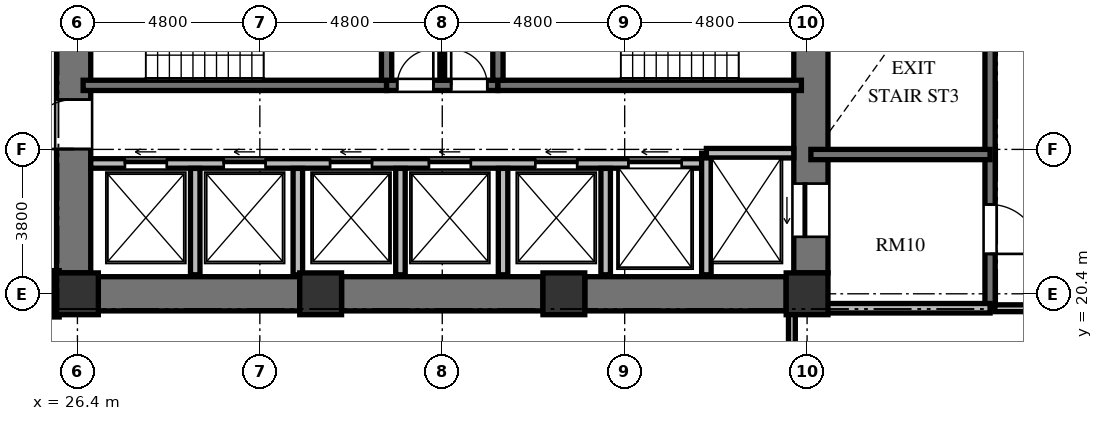
"""IFC4 building model, lengths in metres.
Left out: names, types, materials, properties, quantities, classifications, styles, units other than length and angle.
Written with IfcOpenShell. Run it as: python <this file> out.ifc"""

import sys

from ifc_helpers import new_model, si_unit, direction, frame, frame_2d, origin, origin_2d, place, context, subcontext, project, spatial, rectangle, extrude, element, fill, save


model = new_model("IFC4")
c1 = context("Model", 3, precision=1e-05, world=origin(), true_north=direction((0.0, 1.0)))
c2 = subcontext(c1, "Body", "Model", "MODEL_VIEW")
j1 = project(units=[si_unit("LENGTHUNIT", "METRE"), si_unit("PLANEANGLEUNIT", "RADIAN")], contexts=[c1])
p1 = place(None, origin())
s1 = spatial("IfcSite", under=j1, at=p1, CompositionType="ELEMENT")
p2 = place(p1, origin())
s2 = spatial("IfcBuilding", under=s1, at=p2, CompositionType="ELEMENT")
p3 = place(p2, frame((0.0, 0.0, 43.44)))
s3 = spatial("IfcBuildingStorey", under=s2, at=p3, CompositionType="ELEMENT", Elevation=43.44)
for number, where, z_axis, x_axis in (
    (1, (26.4, 20.4, 0.0), (0.0, 0.0, 1.0), (1.0, 0.0, 0.0)),
    (2, (32.8, 20.4, 0.0), (0.0, 0.0, 1.0), (1.0, 0.0, 0.0)),
    (3, (39.2, 20.4, 0.0), (0.0, 0.0, 1.0), (1.0, 0.0, 0.0)),
    (4, (45.6, 20.4, 0.0), (0.0, 0.0, 1.0), (1.0, 0.0, 0.0)),
):
    element("IfcColumn", number, at=place(p3, frame(where, z_axis=z_axis, x_axis=x_axis)), inside=s3, PredefinedType="COLUMN", context=c2, shape_type="SweptSolid", body=[
        extrude(rectangle(XDim=1.1, YDim=1.1, at=origin_2d()), origin(), (0.0, 0.0, 1.0), 3.648),
    ])
p4 = place(p3, frame((26.3, 20.95, 0.0), z_axis=(0.0, 0.0, 1.0), x_axis=(0.0, 1.0, 0.0)))
e5 = element("IfcWall", 5, at=p4, inside=s3, PredefinedType="SHEAR", context=c2, shape_type="SweptSolid", body=[
    extrude(rectangle(XDim=14.1, YDim=0.9, at=frame_2d((7.05, 0.0))), origin(), (0.0, 0.0, 1.0), 3.648),
])
p5 = place(p4, frame((6.5, 0.0, 0.0)))
e6 = element("IfcOpeningElement", 6, at=p5, cuts=e5, PredefinedType="OPENING", context=c2, shape_type="SweptSolid", body=[
    extrude(rectangle(XDim=1.2, YDim=2.15, at=frame_2d((0.6, 1.075))), frame((0.0, 0.46, 0.0), z_axis=(0.0, -1.0, 0.0), x_axis=(1.0, 0.0, 0.0)), (0.0, 0.0, 1.0), 0.92),
])
p6 = place(p4, frame((9.6, 0.0, 0.0)))
e7 = element("IfcOpeningElement", 7, at=p6, cuts=e5, PredefinedType="OPENING", context=c2, shape_type="SweptSolid", body=[
    extrude(rectangle(XDim=1.3, YDim=2.2, at=frame_2d((0.65, 1.1))), frame((0.0, 0.46, 0.0), z_axis=(0.0, -1.0, 0.0), x_axis=(1.0, 0.0, 0.0)), (0.0, 0.0, 1.0), 0.92),
])
p7 = place(p4, frame((3.26, 0.0, 0.0)))
e8 = element("IfcOpeningElement", 8, at=p7, cuts=e5, PredefinedType="OPENING", context=c2, shape_type="SweptSolid", body=[
    extrude(rectangle(XDim=1.3, YDim=2.2, at=frame_2d((0.65, 1.1))), frame((0.0, 0.46, 0.0), z_axis=(0.0, -1.0, 0.0), x_axis=(1.0, 0.0, 0.0)), (0.0, 0.0, 1.0), 0.92),
])
p8 = place(p3, frame((45.7, 20.95, 0.0), z_axis=(0.0, 0.0, 1.0), x_axis=(0.0, 1.0, 0.0)))
e9 = element("IfcWall", 9, at=p8, inside=s3, PredefinedType="SHEAR", context=c2, shape_type="SweptSolid", body=[
    extrude(rectangle(XDim=14.1, YDim=0.9, at=frame_2d((7.05, 0.0))), origin(), (0.0, 0.0, 1.0), 3.648),
])
p9 = place(p8, frame((11.75, 0.0, 0.0)))
e10 = element("IfcOpeningElement", 10, at=p9, cuts=e9, PredefinedType="OPENING", context=c2, shape_type="SweptSolid", body=[
    extrude(rectangle(XDim=1.4, YDim=2.3, at=frame_2d((0.7, 1.15))), frame((0.0, 0.46, 0.0), z_axis=(0.0, -1.0, 0.0), x_axis=(1.0, 0.0, 0.0)), (0.0, 0.0, 1.0), 0.92),
])
p10 = place(p8, frame((0.95, 0.0, 0.0)))
e11 = element("IfcOpeningElement", 11, at=p10, cuts=e9, PredefinedType="OPENING", context=c2, shape_type="SweptSolid", body=[
    extrude(rectangle(XDim=1.4, YDim=2.3, at=frame_2d((0.7, 1.15))), frame((0.0, 0.46, 0.0), z_axis=(0.0, -1.0, 0.0), x_axis=(1.0, 0.0, 0.0)), (0.0, 0.0, 1.0), 0.92),
])
p11 = place(p3, frame((26.95, 20.4, 0.0), z_axis=(0.0, 0.0, 1.0), x_axis=(1.0, 0.0, 0.0)))
e12 = element("IfcWall", 12, at=p11, inside=s3, PredefinedType="SHEAR", context=c2, shape_type="SweptSolid", body=[
    extrude(rectangle(XDim=5.3, YDim=0.9, at=frame_2d((2.65, 0.0))), origin(), (0.0, 0.0, 1.0), 3.648),
])
p12 = place(p3, frame((33.35, 20.4, 0.0), z_axis=(0.0, 0.0, 1.0), x_axis=(1.0, 0.0, 0.0)))
e13 = element("IfcWall", 13, at=p12, inside=s3, PredefinedType="SHEAR", context=c2, shape_type="SweptSolid", body=[
    extrude(rectangle(XDim=5.3, YDim=0.9, at=frame_2d((2.65, 0.0))), origin(), (0.0, 0.0, 1.0), 3.648),
])
p13 = place(p3, frame((39.75, 20.4, 0.0), z_axis=(0.0, 0.0, 1.0), x_axis=(1.0, 0.0, 0.0)))
e14 = element("IfcWall", 14, at=p13, inside=s3, PredefinedType="SHEAR", context=c2, shape_type="SweptSolid", body=[
    extrude(rectangle(XDim=5.3, YDim=0.9, at=frame_2d((2.65, 0.0))), origin(), (0.0, 0.0, 1.0), 3.648),
])
p14 = place(p3, frame((26.55, 25.885, 0.0), z_axis=(0.0, 0.0, 1.0), x_axis=(1.0, 0.0, 0.0)))
e15 = element("IfcWall", 15, at=p14, inside=s3, PredefinedType="SHEAR", context=c2, shape_type="SweptSolid", body=[
    extrude(rectangle(XDim=7.985, YDim=0.27, at=frame_2d((3.992, 0.0))), origin(), (0.0, 0.0, 1.0), 3.648),
])
p15 = place(p3, frame((34.535, 25.885, 0.0), z_axis=(0.0, 0.0, 1.0), x_axis=(1.0, 0.0, 0.0)))
e16 = element("IfcWall", 16, at=p15, inside=s3, PredefinedType="SHEAR", context=c2, shape_type="SweptSolid", body=[
    extrude(rectangle(XDim=2.93, YDim=0.27, at=frame_2d((1.465, 0.0))), origin(), (0.0, 0.0, 1.0), 3.648),
])
p16 = place(p15, frame((0.28, 0.0, 0.0)))
e17 = element("IfcOpeningElement", 17, at=p16, cuts=e16, PredefinedType="OPENING", context=c2, shape_type="SweptSolid", body=[
    extrude(rectangle(XDim=0.95, YDim=2.1, at=frame_2d((0.475, 1.05))), frame((0.0, 0.145, 0.0), z_axis=(0.0, -1.0, 0.0), x_axis=(1.0, 0.0, 0.0)), (0.0, 0.0, 1.0), 0.29),
])
p17 = place(p15, frame((1.7, 0.0, 0.0)))
e18 = element("IfcOpeningElement", 18, at=p17, cuts=e16, PredefinedType="OPENING", context=c2, shape_type="SweptSolid", body=[
    extrude(rectangle(XDim=0.95, YDim=2.1, at=frame_2d((0.475, 1.05))), frame((0.0, 0.145, 0.0), z_axis=(0.0, -1.0, 0.0), x_axis=(1.0, 0.0, 0.0)), (0.0, 0.0, 1.0), 0.29),
])
p18 = place(p3, frame((37.465, 25.885, 0.0), z_axis=(0.0, 0.0, 1.0), x_axis=(1.0, 0.0, 0.0)))
e19 = element("IfcWall", 19, at=p18, inside=s3, PredefinedType="SHEAR", context=c2, shape_type="SweptSolid", body=[
    extrude(rectangle(XDim=7.985, YDim=0.27, at=frame_2d((3.992, 0.0))), origin(), (0.0, 0.0, 1.0), 3.648),
])
for number, where, z_axis, x_axis in (
    (20, (34.535, 26.02, 0.0), (0.0, 0.0, 1.0), (0.0, 1.0, 0.0)),
    (21, (37.465, 26.02, 0.0), (0.0, 0.0, 1.0), (0.0, 1.0, 0.0)),
):
    element("IfcWall", number, at=place(p3, frame(where, z_axis=z_axis, x_axis=x_axis)), inside=s3, PredefinedType="SHEAR", context=c2, shape_type="SweptSolid", body=[
        extrude(rectangle(XDim=4.08, YDim=0.27, at=frame_2d((2.04, 0.0))), origin(), (0.0, 0.0, 1.0), 3.648),
    ])
p19 = place(p3, frame((36.0, 26.02, 0.0), z_axis=(0.0, 0.0, 1.0), x_axis=(0.0, 1.0, 0.0)))
e22 = element("IfcWall", 22, at=p19, inside=s3, PredefinedType="PARTITIONING", context=c2, shape_type="SweptSolid", body=[
    extrude(rectangle(XDim=4.08, YDim=0.125, at=frame_2d((2.04, 0.0))), origin(), (0.0, 0.0, 1.0), 3.428),
])
p20 = place(p3, frame((26.75, 23.83, 0.0), z_axis=(0.0, 0.0, 1.0), x_axis=(1.0, 0.0, 0.0)))
e23 = element("IfcWall", 23, at=p20, inside=s3, PredefinedType="SOLIDWALL", context=c2, shape_type="SweptSolid", body=[
    extrude(rectangle(XDim=16.2, YDim=0.25, at=frame_2d((8.1, 0.0))), origin(), (0.0, 0.0, 1.0), 3.428),
])
p21 = place(p20, frame((0.9, 0.0, 0.0)))
e24 = element("IfcOpeningElement", 24, at=p21, cuts=e23, PredefinedType="OPENING", context=c2, shape_type="SweptSolid", body=[
    extrude(rectangle(XDim=1.1, YDim=2.2, at=frame_2d((0.55, 1.1))), frame((0.0, 0.135, 0.0), z_axis=(0.0, -1.0, 0.0), x_axis=(1.0, 0.0, 0.0)), (0.0, 0.0, 1.0), 0.27),
])
p22 = place(p20, frame((3.5, 0.0, 0.0)))
e25 = element("IfcOpeningElement", 25, at=p22, cuts=e23, PredefinedType="OPENING", context=c2, shape_type="SweptSolid", body=[
    extrude(rectangle(XDim=1.1, YDim=2.2, at=frame_2d((0.55, 1.1))), frame((0.0, 0.135, 0.0), z_axis=(0.0, -1.0, 0.0), x_axis=(1.0, 0.0, 0.0)), (0.0, 0.0, 1.0), 0.27),
])
p23 = place(p20, frame((6.3, 0.0, 0.0)))
e26 = element("IfcOpeningElement", 26, at=p23, cuts=e23, PredefinedType="OPENING", context=c2, shape_type="SweptSolid", body=[
    extrude(rectangle(XDim=1.1, YDim=2.2, at=frame_2d((0.55, 1.1))), frame((0.0, 0.135, 0.0), z_axis=(0.0, -1.0, 0.0), x_axis=(1.0, 0.0, 0.0)), (0.0, 0.0, 1.0), 0.27),
])
p24 = place(p20, frame((8.9, 0.0, 0.0)))
e27 = element("IfcOpeningElement", 27, at=p24, cuts=e23, PredefinedType="OPENING", context=c2, shape_type="SweptSolid", body=[
    extrude(rectangle(XDim=1.1, YDim=2.2, at=frame_2d((0.55, 1.1))), frame((0.0, 0.135, 0.0), z_axis=(0.0, -1.0, 0.0), x_axis=(1.0, 0.0, 0.0)), (0.0, 0.0, 1.0), 0.27),
])
p25 = place(p20, frame((11.7, 0.0, 0.0)))
e28 = element("IfcOpeningElement", 28, at=p25, cuts=e23, PredefinedType="OPENING", context=c2, shape_type="SweptSolid", body=[
    extrude(rectangle(XDim=1.1, YDim=2.2, at=frame_2d((0.55, 1.1))), frame((0.0, 0.135, 0.0), z_axis=(0.0, -1.0, 0.0), x_axis=(1.0, 0.0, 0.0)), (0.0, 0.0, 1.0), 0.27),
])
p26 = place(p20, frame((14.15, 0.0, 0.0)))
e29 = element("IfcOpeningElement", 29, at=p26, cuts=e23, PredefinedType="OPENING", context=c2, shape_type="SweptSolid", body=[
    extrude(rectangle(XDim=1.4, YDim=2.3, at=frame_2d((0.7, 1.15))), frame((0.0, 0.135, 0.0), z_axis=(0.0, -1.0, 0.0), x_axis=(1.0, 0.0, 0.0)), (0.0, 0.0, 1.0), 0.27),
])
p27 = place(p3, frame((42.95, 20.9, 0.0), z_axis=(0.0, 0.0, 1.0), x_axis=(0.0, 1.0, 0.0)))
e30 = element("IfcWall", 30, at=p27, inside=s3, PredefinedType="SOLIDWALL", context=c2, shape_type="SweptSolid", body=[
    extrude(rectangle(XDim=3.2, YDim=0.25, at=frame_2d((1.6, 0.0))), origin(), (0.0, 0.0, 1.0), 3.428),
])
p28 = place(p3, frame((42.95, 24.1, 0.0), z_axis=(0.0, 0.0, 1.0), x_axis=(1.0, 0.0, 0.0)))
e31 = element("IfcWall", 31, at=p28, inside=s3, PredefinedType="SOLIDWALL", context=c2, shape_type="SweptSolid", body=[
    extrude(rectangle(XDim=2.3, YDim=0.25, at=frame_2d((1.15, 0.0))), origin(), (0.0, 0.0, 1.0), 3.428),
])
for number, where, z_axis, x_axis in (
    (32, (29.5, 20.9, 0.0), (0.0, 0.0, 1.0), (0.0, 1.0, 0.0)),
    (33, (32.2, 20.9, 0.0), (0.0, 0.0, 1.0), (0.0, 1.0, 0.0)),
    (34, (34.9, 20.9, 0.0), (0.0, 0.0, 1.0), (0.0, 1.0, 0.0)),
    (35, (37.6, 20.9, 0.0), (0.0, 0.0, 1.0), (0.0, 1.0, 0.0)),
    (36, (40.3, 20.9, 0.0), (0.0, 0.0, 1.0), (0.0, 1.0, 0.0)),
):
    element("IfcWall", number, at=place(p3, frame(where, z_axis=z_axis, x_axis=x_axis)), inside=s3, PredefinedType="SOLIDWALL", context=c2, shape_type="SweptSolid", body=[
        extrude(rectangle(XDim=2.8, YDim=0.25, at=frame_2d((1.4, 0.0))), origin(), (0.0, 0.0, 1.0), 3.428),
    ])
p29 = place(p3, frame((50.415, 35.845, 0.0), z_axis=(0.0, 0.0, 1.0), x_axis=(0.0, -1.0, 0.0)))
e37 = element("IfcWall", 37, at=p29, inside=s3, PredefinedType="SHEAR", context=c2, shape_type="SweptSolid", body=[
    extrude(rectangle(XDim=15.825, YDim=0.27, at=frame_2d((7.913, 0.0))), origin(), (0.0, 0.0, 1.0), 3.648),
])
p30 = place(p29, frame((4.445, 0.0, 0.0)))
e38 = element("IfcOpeningElement", 38, at=p30, cuts=e37, PredefinedType="OPENING", context=c2, shape_type="SweptSolid", body=[
    extrude(rectangle(XDim=1.2, YDim=2.15, at=frame_2d((0.6, 1.075))), frame((0.0, 0.145, 0.0), z_axis=(0.0, -1.0, 0.0), x_axis=(1.0, 0.0, 0.0)), (0.0, 0.0, 1.0), 0.29),
])
p31 = place(p29, frame((1.295, 0.0, 0.0)))
e39 = element("IfcOpeningElement", 39, at=p31, cuts=e37, PredefinedType="OPENING", context=c2, shape_type="SweptSolid", body=[
    extrude(rectangle(XDim=1.3, YDim=2.2, at=frame_2d((0.65, 1.1))), frame((0.0, 0.145, 0.0), z_axis=(0.0, -1.0, 0.0), x_axis=(1.0, 0.0, 0.0)), (0.0, 0.0, 1.0), 0.29),
])
p32 = place(p29, frame((13.095, 0.0, 0.0)))
e40 = element("IfcOpeningElement", 40, at=p32, cuts=e37, PredefinedType="OPENING", context=c2, shape_type="SweptSolid", body=[
    extrude(rectangle(XDim=1.3, YDim=2.2, at=frame_2d((0.65, 1.1))), frame((0.0, 0.145, 0.0), z_axis=(0.0, -1.0, 0.0), x_axis=(1.0, 0.0, 0.0)), (0.0, 0.0, 1.0), 0.29),
])
p33 = place(p3, frame((45.7, 24.065, 0.0), z_axis=(0.0, 0.0, 1.0), x_axis=(1.0, 0.0, 0.0)))
e41 = element("IfcWall", 41, at=p33, inside=s3, PredefinedType="SHEAR", context=c2, shape_type="SweptSolid", body=[
    extrude(rectangle(XDim=4.715, YDim=0.27, at=frame_2d((2.357, 0.0))), origin(), (0.0, 0.0, 1.0), 3.648),
])
p34 = place(p3, frame((45.7, 20.02, 0.0), z_axis=(0.0, 0.0, 1.0), x_axis=(1.0, 0.0, 0.0)))
e42 = element("IfcWall", 42, at=p34, inside=s3, PredefinedType="SOLIDWALL", context=c2, shape_type="SweptSolid", body=[
    extrude(rectangle(XDim=4.715, YDim=0.25, at=frame_2d((2.357, 0.0))), origin(), (0.0, 0.0, 1.0), 2.813),
])
p35 = place(p3, frame((53.19, 20.02, 0.0), z_axis=(0.0, 0.0, 1.0), x_axis=(-1.0, 0.0, 0.0)))
e43 = element("IfcWall", 43, at=p35, inside=s3, PredefinedType="PARTITIONING", context=c2, shape_type="SweptSolid", body=[
    extrude(rectangle(XDim=2.65, YDim=0.18, at=frame_2d((1.325, 0.0))), origin(), (0.0, 0.0, 1.0), 2.813),
])
p36 = place(p3, frame((25.83, 21.01, 0.0), z_axis=(0.0, 0.0, 1.0), x_axis=(0.0, -1.0, 0.0)))
e44 = element("IfcWall", 44, at=p36, inside=s3, PredefinedType="PARTITIONING", context=c2, shape_type="SweptSolid", body=[
    extrude(rectangle(XDim=1.22, YDim=0.18, at=frame_2d((0.61, 0.0))), origin(), (0.0, 0.0, 1.0), 3.428),
])
p37 = place(p3, frame((45.2, 19.91, 0.0), z_axis=(0.0, 0.0, 1.0), x_axis=(0.0, -1.0, 0.0)))
e45 = element("IfcWall", 45, at=p37, inside=s3, PredefinedType="PARTITIONING", context=c2, shape_type="SweptSolid", body=[
    extrude(rectangle(XDim=2.55, YDim=0.18, at=frame_2d((1.275, 0.0))), origin(), (0.0, 0.0, 1.0), 3.428),
])
p38 = place(p16, origin())
e46 = element("IfcDoor", 46, at=p38, inside=s3, OperationType="SINGLE_SWING_RIGHT", PredefinedType="DOOR", context=c2, shape_type="SweptSolid", body=[
    extrude(rectangle(XDim=0.95, YDim=2.1, at=frame_2d((0.475, 1.05))), frame((0.0, 0.025, 0.0), z_axis=(0.0, -1.0, 0.0), x_axis=(1.0, 0.0, 0.0)), (0.0, 0.0, 1.0), 0.05),
])
fill(e17, e46)
p39 = place(p17, origin())
e47 = element("IfcDoor", 47, at=p39, inside=s3, OperationType="SINGLE_SWING_LEFT", PredefinedType="DOOR", context=c2, shape_type="SweptSolid", body=[
    extrude(rectangle(XDim=0.95, YDim=2.1, at=frame_2d((0.475, 1.05))), frame((0.0, 0.025, 0.0), z_axis=(0.0, -1.0, 0.0), x_axis=(1.0, 0.0, 0.0)), (0.0, 0.0, 1.0), 0.05),
])
fill(e18, e47)
p40 = place(p7, origin())
e48 = element("IfcDoor", 48, at=p40, inside=s3, OperationType="SINGLE_SWING_LEFT", PredefinedType="DOOR", context=c2, shape_type="SweptSolid", body=[
    extrude(rectangle(XDim=1.3, YDim=2.2, at=frame_2d((0.65, 1.1))), frame((0.0, 0.025, 0.0), z_axis=(0.0, -1.0, 0.0), x_axis=(1.0, 0.0, 0.0)), (0.0, 0.0, 1.0), 0.05),
])
fill(e8, e48)
p41 = place(p21, origin())
e49 = element("IfcDoor", 49, at=p41, inside=s3, OperationType="SLIDING_TO_LEFT", PredefinedType="DOOR", context=c2, shape_type="SweptSolid", body=[
    extrude(rectangle(XDim=1.1, YDim=2.2, at=frame_2d((0.55, 1.1))), frame((0.0, 0.025, 0.0), z_axis=(0.0, -1.0, 0.0), x_axis=(1.0, 0.0, 0.0)), (0.0, 0.0, 1.0), 0.05),
])
fill(e24, e49)
p42 = place(p22, origin())
e50 = element("IfcDoor", 50, at=p42, inside=s3, OperationType="SLIDING_TO_LEFT", PredefinedType="DOOR", context=c2, shape_type="SweptSolid", body=[
    extrude(rectangle(XDim=1.1, YDim=2.2, at=frame_2d((0.55, 1.1))), frame((0.0, 0.025, 0.0), z_axis=(0.0, -1.0, 0.0), x_axis=(1.0, 0.0, 0.0)), (0.0, 0.0, 1.0), 0.05),
])
fill(e25, e50)
p43 = place(p23, origin())
e51 = element("IfcDoor", 51, at=p43, inside=s3, OperationType="SLIDING_TO_LEFT", PredefinedType="DOOR", context=c2, shape_type="SweptSolid", body=[
    extrude(rectangle(XDim=1.1, YDim=2.2, at=frame_2d((0.55, 1.1))), frame((0.0, 0.025, 0.0), z_axis=(0.0, -1.0, 0.0), x_axis=(1.0, 0.0, 0.0)), (0.0, 0.0, 1.0), 0.05),
])
fill(e26, e51)
p44 = place(p24, origin())
e52 = element("IfcDoor", 52, at=p44, inside=s3, OperationType="SLIDING_TO_LEFT", PredefinedType="DOOR", context=c2, shape_type="SweptSolid", body=[
    extrude(rectangle(XDim=1.1, YDim=2.2, at=frame_2d((0.55, 1.1))), frame((0.0, 0.025, 0.0), z_axis=(0.0, -1.0, 0.0), x_axis=(1.0, 0.0, 0.0)), (0.0, 0.0, 1.0), 0.05),
])
fill(e27, e52)
p45 = place(p25, origin())
e53 = element("IfcDoor", 53, at=p45, inside=s3, OperationType="SLIDING_TO_LEFT", PredefinedType="DOOR", context=c2, shape_type="SweptSolid", body=[
    extrude(rectangle(XDim=1.1, YDim=2.2, at=frame_2d((0.55, 1.1))), frame((0.0, 0.025, 0.0), z_axis=(0.0, -1.0, 0.0), x_axis=(1.0, 0.0, 0.0)), (0.0, 0.0, 1.0), 0.05),
])
fill(e28, e53)
p46 = place(p10, origin())
e54 = element("IfcDoor", 54, at=p46, inside=s3, OperationType="SLIDING_TO_LEFT", PredefinedType="DOOR", context=c2, shape_type="SweptSolid", body=[
    extrude(rectangle(XDim=1.4, YDim=2.3, at=frame_2d((0.7, 1.15))), frame((0.0, 0.025, 0.0), z_axis=(0.0, -1.0, 0.0), x_axis=(1.0, 0.0, 0.0)), (0.0, 0.0, 1.0), 0.05),
])
fill(e11, e54)
p47 = place(p26, origin())
e55 = element("IfcDoor", 55, at=p47, inside=s3, OperationType="SLIDING_TO_LEFT", PredefinedType="DOOR", context=c2, shape_type="SweptSolid", body=[
    extrude(rectangle(XDim=1.4, YDim=2.3, at=frame_2d((0.7, 1.15))), frame((0.0, 0.025, 0.0), z_axis=(0.0, -1.0, 0.0), x_axis=(1.0, 0.0, 0.0)), (0.0, 0.0, 1.0), 0.05),
])
fill(e29, e55)
p48 = place(p32, origin())
e56 = element("IfcDoor", 56, at=p48, inside=s3, OperationType="SINGLE_SWING_RIGHT", PredefinedType="DOOR", context=c2, shape_type="SweptSolid", body=[
    extrude(rectangle(XDim=1.3, YDim=2.2, at=frame_2d((0.65, 1.1))), frame((0.0, 0.025, 0.0), z_axis=(0.0, -1.0, 0.0), x_axis=(1.0, 0.0, 0.0)), (0.0, 0.0, 1.0), 0.05),
])
fill(e40, e56)
save(model, sys.argv[1])
